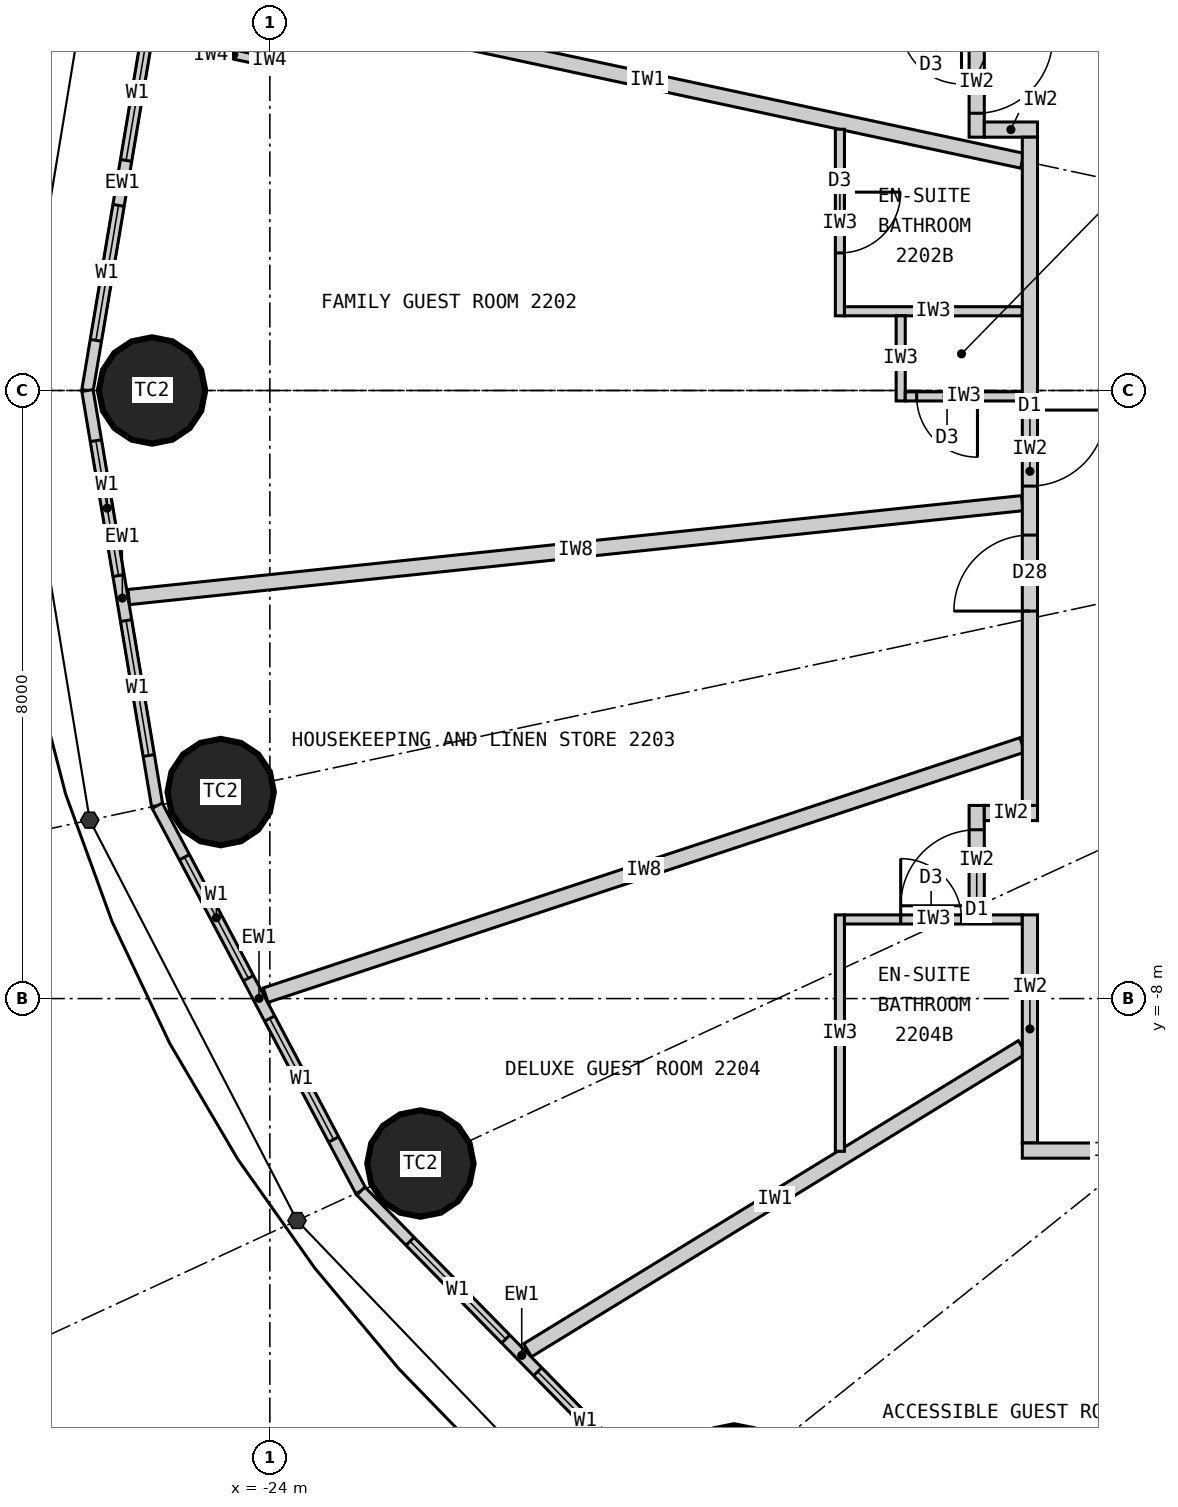
"""IFC4 building model, lengths in metres.
Left out: names, types, materials, properties, quantities, classifications, styles, units other than length and angle.
Written with IfcOpenShell. Run it as: python <this file> out.ifc"""

import sys

from ifc_helpers import new_model, si_unit, direction, frame, frame_2d, origin, origin_2d, place, context, subcontext, project, spatial, rectangle, circle, extrude, element, fill, save


model = new_model("IFC4")
c1 = context("Model", 3, precision=1e-05, world=origin(), true_north=direction((0.0, 1.0)))
c2 = subcontext(c1, "Body", "Model", "MODEL_VIEW")
j1 = project(units=[si_unit("LENGTHUNIT", "METRE"), si_unit("PLANEANGLEUNIT", "RADIAN")], contexts=[c1])
p1 = place(None, origin())
s1 = spatial("IfcSite", under=j1, at=p1, CompositionType="ELEMENT")
p2 = place(p1, origin())
s2 = spatial("IfcBuilding", under=s1, at=p2, CompositionType="ELEMENT")
p3 = place(p2, frame((0.0, 0.0, 87.0)))
s3 = spatial("IfcBuildingStorey", under=s2, at=p3, CompositionType="ELEMENT", Elevation=87.0)
for number, where, z_axis, x_axis in (
    (1, (-25.55, 0.0, 0.0), (0.0, 0.0, 1.0), (1.0, 0.0, 0.0)),
    (2, (-24.647, -5.283, 0.0), (0.0, 0.0, 1.0), (1.0, 0.0, 0.0)),
    (3, (-22.019, -10.17, 0.0), (0.0, 0.0, 1.0), (1.0, 0.0, 0.0)),
    (4, (-17.892, -14.313, 0.0), (0.0, 0.0, 1.0), (1.0, 0.0, 0.0)),
):
    element("IfcColumn", number, at=place(p3, frame(where, z_axis=z_axis, x_axis=x_axis)), inside=s3, PredefinedType="COLUMN", context=c2, shape_type="SweptSolid", body=[
        extrude(circle(Radius=0.7, at=origin_2d()), origin(), (0.0, 0.0, 1.0), 3.3),
    ])
p4 = place(p3, frame((-25.482, 5.462, 0.0), z_axis=(0.0, 0.0, 1.0), x_axis=(-0.165642551694, -0.986185857264, 0.0)))
e5 = element("IfcWall", 5, at=p4, inside=s3, PredefinedType="ELEMENTEDWALL", context=c2, shape_type="SweptSolid", body=[
    extrude(rectangle(XDim=5.539, YDim=0.15, at=frame_2d((2.77, 0.0))), origin(), (0.0, 0.0, 1.0), 3.12),
])
p5 = place(p4, frame((0.669, 0.0, 0.9)))
e6 = element("IfcOpeningElement", 6, at=p5, cuts=e5, PredefinedType="OPENING", context=c2, shape_type="SweptSolid", body=[
    extrude(rectangle(XDim=1.8, YDim=1.9, at=frame_2d((0.9, 0.95))), frame((0.0, 0.085, 0.0), z_axis=(0.0, -1.0, 0.0), x_axis=(1.0, 0.0, 0.0)), (0.0, 0.0, 1.0), 0.17),
])
p6 = place(p4, frame((3.07, 0.0, 0.9)))
e7 = element("IfcOpeningElement", 7, at=p6, cuts=e5, PredefinedType="OPENING", context=c2, shape_type="SweptSolid", body=[
    extrude(rectangle(XDim=1.8, YDim=1.9, at=frame_2d((0.9, 0.95))), frame((0.0, 0.085, 0.0), z_axis=(0.0, -1.0, 0.0), x_axis=(1.0, 0.0, 0.0)), (0.0, 0.0, 1.0), 0.17),
])
p7 = place(p3, frame((-26.4, 0.0, 0.0), z_axis=(0.0, 0.0, 1.0), x_axis=(0.165642551694, -0.986185857264, 0.0)))
e8 = element("IfcWall", 8, at=p7, inside=s3, PredefinedType="ELEMENTEDWALL", context=c2, shape_type="SweptSolid", body=[
    extrude(rectangle(XDim=5.539, YDim=0.15, at=frame_2d((2.77, 0.0))), origin(), (0.0, 0.0, 1.0), 3.12),
])
p8 = place(p7, frame((0.669, 0.0, 0.9)))
e9 = element("IfcOpeningElement", 9, at=p8, cuts=e8, PredefinedType="OPENING", context=c2, shape_type="SweptSolid", body=[
    extrude(rectangle(XDim=1.8, YDim=1.9, at=frame_2d((0.9, 0.95))), frame((0.0, 0.085, 0.0), z_axis=(0.0, -1.0, 0.0), x_axis=(1.0, 0.0, 0.0)), (0.0, 0.0, 1.0), 0.17),
])
p9 = place(p7, frame((3.07, 0.0, 0.9)))
e10 = element("IfcOpeningElement", 10, at=p9, cuts=e8, PredefinedType="OPENING", context=c2, shape_type="SweptSolid", body=[
    extrude(rectangle(XDim=1.8, YDim=1.9, at=frame_2d((0.9, 0.95))), frame((0.0, 0.085, 0.0), z_axis=(0.0, -1.0, 0.0), x_axis=(1.0, 0.0, 0.0)), (0.0, 0.0, 1.0), 0.17),
])
p10 = place(p3, frame((-25.482, -5.462, 0.0), z_axis=(0.0, 0.0, 1.0), x_axis=(0.467296867008, -0.884100468321, 0.0)))
e11 = element("IfcWall", 11, at=p10, inside=s3, PredefinedType="ELEMENTEDWALL", context=c2, shape_type="SweptSolid", body=[
    extrude(rectangle(XDim=5.734, YDim=0.15, at=frame_2d((2.867, 0.0))), origin(), (0.0, 0.0, 1.0), 3.12),
])
p11 = place(p10, frame((0.767, 0.0, 0.9)))
e12 = element("IfcOpeningElement", 12, at=p11, cuts=e11, PredefinedType="OPENING", context=c2, shape_type="SweptSolid", body=[
    extrude(rectangle(XDim=1.8, YDim=1.9, at=frame_2d((0.9, 0.95))), frame((0.0, 0.085, 0.0), z_axis=(0.0, -1.0, 0.0), x_axis=(1.0, 0.0, 0.0)), (0.0, 0.0, 1.0), 0.17),
])
p12 = place(p10, frame((3.167, 0.0, 0.9)))
e13 = element("IfcOpeningElement", 13, at=p12, cuts=e11, PredefinedType="OPENING", context=c2, shape_type="SweptSolid", body=[
    extrude(rectangle(XDim=1.8, YDim=1.9, at=frame_2d((0.9, 0.95))), frame((0.0, 0.085, 0.0), z_axis=(0.0, -1.0, 0.0), x_axis=(1.0, 0.0, 0.0)), (0.0, 0.0, 1.0), 0.17),
])
p13 = place(p3, frame((-22.803, -10.532, 0.0), z_axis=(0.0, 0.0, 1.0), x_axis=(0.699602905915, -0.714531856557, 0.0)))
e14 = element("IfcWall", 14, at=p13, inside=s3, PredefinedType="ELEMENTEDWALL", context=c2, shape_type="SweptSolid", body=[
    extrude(rectangle(XDim=6.051, YDim=0.15, at=frame_2d((3.025, 0.0))), origin(), (0.0, 0.0, 1.0), 3.12),
])
p14 = place(p13, frame((0.926, 0.0, 0.9)))
e15 = element("IfcOpeningElement", 15, at=p14, cuts=e14, PredefinedType="OPENING", context=c2, shape_type="SweptSolid", body=[
    extrude(rectangle(XDim=1.8, YDim=1.9, at=frame_2d((0.9, 0.95))), frame((0.0, 0.085, 0.0), z_axis=(0.0, -1.0, 0.0), x_axis=(1.0, 0.0, 0.0)), (0.0, 0.0, 1.0), 0.17),
])
p15 = place(p13, frame((3.325, 0.0, 0.9)))
e16 = element("IfcOpeningElement", 16, at=p15, cuts=e14, PredefinedType="OPENING", context=c2, shape_type="SweptSolid", body=[
    extrude(rectangle(XDim=1.8, YDim=1.9, at=frame_2d((0.9, 0.95))), frame((0.0, 0.085, 0.0), z_axis=(0.0, -1.0, 0.0), x_axis=(1.0, 0.0, 0.0)), (0.0, 0.0, 1.0), 0.17),
])
p16 = place(p3, frame((-14.1, 3.022, 0.0), z_axis=(0.0, 0.0, 1.0), x_axis=(-0.977790014929, 0.209586943072, 0.0)))
e17 = element("IfcWall", 17, at=p16, inside=s3, PredefinedType="PARTITIONING", context=c2, shape_type="SweptSolid", body=[
    extrude(rectangle(XDim=10.087, YDim=0.2, at=frame_2d((5.043, 0.0))), origin(), (0.0, 0.0, 1.0), 2.27),
])
p17 = place(p3, frame((-14.1, -1.482, 0.0), z_axis=(0.0, 0.0, 1.0), x_axis=(-0.994522076235, -0.104526742422, 0.0)))
e18 = element("IfcWall", 18, at=p17, inside=s3, PredefinedType="PARTITIONING", context=c2, shape_type="SweptSolid", body=[
    extrude(rectangle(XDim=11.821, YDim=0.2, at=frame_2d((5.91, 0.0))), origin(), (0.0, 0.0, 1.0), 2.27),
])
p18 = place(p3, frame((-14.1, -4.663, 0.0), z_axis=(0.0, 0.0, 1.0), x_axis=(-0.949432655039, -0.31397075269, 0.0)))
e19 = element("IfcWall", 19, at=p18, inside=s3, PredefinedType="PARTITIONING", context=c2, shape_type="SweptSolid", body=[
    extrude(rectangle(XDim=10.486, YDim=0.2, at=frame_2d((5.243, 0.0))), origin(), (0.0, 0.0, 1.0), 3.12),
])
p19 = place(p3, frame((-14.1, -8.639, 0.0), z_axis=(0.0, 0.0, 1.0), x_axis=(-0.852672493023, -0.522445805459, 0.0)))
e20 = element("IfcWall", 20, at=p19, inside=s3, PredefinedType="PARTITIONING", context=c2, shape_type="SweptSolid", body=[
    extrude(rectangle(XDim=7.633, YDim=0.2, at=frame_2d((3.817, 0.0))), origin(), (0.0, 0.0, 1.0), 3.12),
])
p20 = place(p3, frame((-16.5, 3.437, 0.0), z_axis=(0.0, 0.0, 1.0), x_axis=(0.0, -1.0, 0.0)))
e21 = element("IfcWall", 21, at=p20, inside=s3, PredefinedType="PARTITIONING", context=c2, shape_type="SweptSolid", body=[
    extrude(rectangle(XDim=2.455, YDim=0.12, at=frame_2d((1.227, 0.0))), origin(), (0.0, 0.0, 1.0), 3.12),
])
p21 = place(p20, frame((0.827, 0.0, 0.0)))
e22 = element("IfcOpeningElement", 22, at=p21, cuts=e21, PredefinedType="OPENING", context=c2, shape_type="SweptSolid", body=[
    extrude(rectangle(XDim=0.8, YDim=2.1, at=frame_2d((0.4, 1.05))), frame((0.0, 0.07, 0.0), z_axis=(0.0, -1.0, 0.0), x_axis=(1.0, 0.0, 0.0)), (0.0, 0.0, 1.0), 0.14),
])
p22 = place(p3, frame((-14.1, 1.042, 0.0), z_axis=(0.0, 0.0, 1.0), x_axis=(-1.0, 0.0, 0.0)))
e23 = element("IfcWall", 23, at=p22, inside=s3, PredefinedType="PARTITIONING", context=c2, shape_type="SweptSolid", body=[
    extrude(rectangle(XDim=2.34, YDim=0.12, at=frame_2d((1.17, 0.0))), origin(), (0.0, 0.0, 1.0), 3.12),
])
p23 = place(p3, frame((-15.7, 0.982, 0.0), z_axis=(0.0, 0.0, 1.0), x_axis=(0.0, -1.0, 0.0)))
e24 = element("IfcWall", 24, at=p23, inside=s3, PredefinedType="PARTITIONING", context=c2, shape_type="SweptSolid", body=[
    extrude(rectangle(XDim=1.12, YDim=0.12, at=frame_2d((0.56, 0.0))), origin(), (0.0, 0.0, 1.0), 3.12),
])
p24 = place(p3, frame((-14.1, -0.078, 0.0), z_axis=(0.0, 0.0, 1.0), x_axis=(-1.0, 0.0, 0.0)))
e25 = element("IfcWall", 25, at=p24, inside=s3, PredefinedType="PARTITIONING", context=c2, shape_type="SweptSolid", body=[
    extrude(rectangle(XDim=1.54, YDim=0.12, at=frame_2d((0.77, 0.0))), origin(), (0.0, 0.0, 1.0), 2.22),
])
p25 = place(p24, frame((0.59, 0.0, 0.0)))
e26 = element("IfcOpeningElement", 26, at=p25, cuts=e25, PredefinedType="OPENING", context=c2, shape_type="SweptSolid", body=[
    extrude(rectangle(XDim=0.8, YDim=2.1, at=frame_2d((0.4, 1.05))), frame((0.0, 0.07, 0.0), z_axis=(0.0, -1.0, 0.0), x_axis=(1.0, 0.0, 0.0)), (0.0, 0.0, 1.0), 0.14),
])
p26 = place(p3, frame((-16.5, -10.01, 0.0), z_axis=(0.0, 0.0, 1.0), x_axis=(0.0, 1.0, 0.0)))
e27 = element("IfcWall", 27, at=p26, inside=s3, PredefinedType="PARTITIONING", context=c2, shape_type="SweptSolid", body=[
    extrude(rectangle(XDim=3.111, YDim=0.12, at=frame_2d((1.555, 0.0))), origin(), (0.0, 0.0, 1.0), 3.12),
])
p27 = place(p3, frame((-14.1, -6.959, 0.0), z_axis=(0.0, 0.0, 1.0), x_axis=(-1.0, 0.0, 0.0)))
e28 = element("IfcWall", 28, at=p27, inside=s3, PredefinedType="PARTITIONING", context=c2, shape_type="SweptSolid", body=[
    extrude(rectangle(XDim=2.34, YDim=0.12, at=frame_2d((1.17, 0.0))), origin(), (0.0, 0.0, 1.0), 3.12),
])
p28 = place(p27, frame((0.8, 0.0, 0.0)))
e29 = element("IfcOpeningElement", 29, at=p28, cuts=e28, PredefinedType="OPENING", context=c2, shape_type="SweptSolid", body=[
    extrude(rectangle(XDim=0.8, YDim=2.1, at=frame_2d((0.4, 1.05))), frame((0.0, 0.07, 0.0), z_axis=(0.0, -1.0, 0.0), x_axis=(1.0, 0.0, 0.0)), (0.0, 0.0, 1.0), 0.14),
])
p29 = place(p3, frame((-14.7, 4.772, 0.0), z_axis=(0.0, 0.0, 1.0), x_axis=(0.0, -1.0, 0.0)))
e30 = element("IfcWall", 30, at=p29, inside=s3, PredefinedType="PARTITIONING", context=c2, shape_type="SweptSolid", body=[
    extrude(rectangle(XDim=1.44, YDim=0.2, at=frame_2d((0.72, 0.0))), origin(), (0.0, 0.0, 1.0), 3.12),
])
p30 = place(p29, frame((0.125, 0.0, 0.0)))
e31 = element("IfcOpeningElement", 31, at=p30, cuts=e30, PredefinedType="OPENING", context=c2, shape_type="SweptSolid", body=[
    extrude(rectangle(XDim=1.0, YDim=2.0, at=frame_2d((0.5, 1.0))), frame((0.0, 0.11, 0.0), z_axis=(0.0, -1.0, 0.0), x_axis=(1.0, 0.0, 0.0)), (0.0, 0.0, 1.0), 0.22),
])
p31 = place(p3, frame((-13.9, 3.433, 0.0), z_axis=(0.0, 0.0, 1.0), x_axis=(-1.0, 0.0, 0.0)))
e32 = element("IfcWall", 32, at=p31, inside=s3, PredefinedType="PARTITIONING", context=c2, shape_type="SweptSolid", body=[
    extrude(rectangle(XDim=0.7, YDim=0.2, at=frame_2d((0.35, 0.0))), origin(), (0.0, 0.0, 1.0), 2.27),
])
p32 = place(p3, frame((-14.7, -5.459, 0.0), z_axis=(0.0, 0.0, 1.0), x_axis=(0.0, -1.0, 0.0)))
e33 = element("IfcWall", 33, at=p32, inside=s3, PredefinedType="PARTITIONING", context=c2, shape_type="SweptSolid", body=[
    extrude(rectangle(XDim=1.44, YDim=0.2, at=frame_2d((0.72, 0.0))), origin(), (0.0, 0.0, 1.0), 3.12),
])
p33 = place(p32, frame((0.32, 0.0, 0.0)))
e34 = element("IfcOpeningElement", 34, at=p33, cuts=e33, PredefinedType="OPENING", context=c2, shape_type="SweptSolid", body=[
    extrude(rectangle(XDim=1.0, YDim=2.2, at=frame_2d((0.5, 1.1))), frame((0.0, 0.11, 0.0), z_axis=(0.0, -1.0, 0.0), x_axis=(1.0, 0.0, 0.0)), (0.0, 0.0, 1.0), 0.22),
])
p34 = place(p3, frame((-13.9, -5.559, 0.0), z_axis=(0.0, 0.0, 1.0), x_axis=(-1.0, 0.0, 0.0)))
e35 = element("IfcWall", 35, at=p34, inside=s3, PredefinedType="PARTITIONING", context=c2, shape_type="SweptSolid", body=[
    extrude(rectangle(XDim=0.7, YDim=0.2, at=frame_2d((0.35, 0.0))), origin(), (0.0, 0.0, 1.0), 3.12),
])
p35 = place(p3, frame((-14.0, 3.333, 0.0), z_axis=(0.0, 0.0, 1.0), x_axis=(0.0, -1.0, 0.0)))
e36 = element("IfcWall", 36, at=p35, inside=s3, PredefinedType="PARTITIONING", context=c2, shape_type="SweptSolid", body=[
    extrude(rectangle(XDim=8.792, YDim=0.2, at=frame_2d((4.396, 0.0))), origin(), (0.0, 0.0, 1.0), 3.12),
])
p36 = place(p35, frame((3.59, 0.0, 0.0)))
e37 = element("IfcOpeningElement", 37, at=p36, cuts=e36, PredefinedType="OPENING", context=c2, shape_type="SweptSolid", body=[
    extrude(rectangle(XDim=1.0, YDim=2.2, at=frame_2d((0.5, 1.1))), frame((0.0, 0.11, 0.0), z_axis=(0.0, -1.0, 0.0), x_axis=(1.0, 0.0, 0.0)), (0.0, 0.0, 1.0), 0.22),
])
p37 = place(p35, frame((5.234, 0.0, 0.0)))
e38 = element("IfcOpeningElement", 38, at=p37, cuts=e36, PredefinedType="OPENING", context=c2, shape_type="SweptSolid", body=[
    extrude(rectangle(XDim=1.0, YDim=2.2, at=frame_2d((0.5, 1.1))), frame((0.0, 0.11, 0.0), z_axis=(0.0, -1.0, 0.0), x_axis=(1.0, 0.0, 0.0)), (0.0, 0.0, 1.0), 0.22),
])
p38 = place(p3, frame((-14.0, -6.899, 0.0), z_axis=(0.0, 0.0, 1.0), x_axis=(0.0, -1.0, 0.0)))
e39 = element("IfcWall", 39, at=p38, inside=s3, PredefinedType="PARTITIONING", context=c2, shape_type="SweptSolid", body=[
    extrude(rectangle(XDim=3.001, YDim=0.2, at=frame_2d((1.5, 0.0))), origin(), (0.0, 0.0, 1.0), 3.12),
])
p39 = place(p3, frame((-11.769, -10.0, 0.0), z_axis=(0.0, 0.0, 1.0), x_axis=(-1.0, 0.0, 0.0)))
e40 = element("IfcWall", 40, at=p39, inside=s3, PredefinedType="PARTITIONING", context=c2, shape_type="SweptSolid", body=[
    extrude(rectangle(XDim=2.331, YDim=0.2, at=frame_2d((1.166, 0.0))), origin(), (0.0, 0.0, 1.0), 3.12),
])
p40 = place(p3, frame((-23.925, 5.026, 0.0), z_axis=(0.0, 0.0, 1.0), x_axis=(-0.209681192172, -0.977769808109, 0.0)))
e41 = element("IfcWall", 41, at=p40, inside=s3, PredefinedType="PARTITIONING", context=c2, shape_type="SweptSolid", body=[
    extrude(rectangle(XDim=0.767, YDim=0.12, at=frame_2d((0.384, 0.0))), origin(), (0.0, 0.0, 1.0), 3.12),
])
p41 = place(p3, frame((-24.132, 4.347, 0.0), z_axis=(0.0, 0.0, 1.0), x_axis=(-0.977776882509, 0.209648200638, 0.0)))
e42 = element("IfcWall", 42, at=p41, inside=s3, PredefinedType="PARTITIONING", context=c2, shape_type="SweptSolid", body=[
    extrude(rectangle(XDim=0.7, YDim=0.12, at=frame_2d((0.35, 0.0))), origin(), (0.0, 0.0, 1.0), 3.12),
])
p42 = place(p3, frame((-24.816, 4.494, 0.0), z_axis=(0.0, 0.0, 1.0), x_axis=(-0.890303208847, 0.455368198623, 0.0)))
e43 = element("IfcWall", 43, at=p42, inside=s3, PredefinedType="PARTITIONING", context=c2, shape_type="SweptSolid", body=[
    extrude(rectangle(XDim=0.418, YDim=0.12, at=frame_2d((0.209, 0.0))), origin(), (0.0, 0.0, 1.0), 3.12),
])
p43 = place(p5, origin())
e44 = element("IfcWindow", 44, at=p43, inside=s3, PartitioningType="SINGLE_PANEL", PredefinedType="WINDOW", context=c2, shape_type="SweptSolid", body=[
    extrude(rectangle(XDim=1.8, YDim=1.9, at=frame_2d((0.9, 0.95))), frame((0.0, 0.03, 0.0), z_axis=(0.0, -1.0, 0.0), x_axis=(1.0, 0.0, 0.0)), (0.0, 0.0, 1.0), 0.06),
])
fill(e6, e44)
p44 = place(p6, origin())
e45 = element("IfcWindow", 45, at=p44, inside=s3, PartitioningType="SINGLE_PANEL", PredefinedType="WINDOW", context=c2, shape_type="SweptSolid", body=[
    extrude(rectangle(XDim=1.8, YDim=1.9, at=frame_2d((0.9, 0.95))), frame((0.0, 0.03, 0.0), z_axis=(0.0, -1.0, 0.0), x_axis=(1.0, 0.0, 0.0)), (0.0, 0.0, 1.0), 0.06),
])
fill(e7, e45)
p45 = place(p8, origin())
e46 = element("IfcWindow", 46, at=p45, inside=s3, PartitioningType="SINGLE_PANEL", PredefinedType="WINDOW", context=c2, shape_type="SweptSolid", body=[
    extrude(rectangle(XDim=1.8, YDim=1.9, at=frame_2d((0.9, 0.95))), frame((0.0, 0.03, 0.0), z_axis=(0.0, -1.0, 0.0), x_axis=(1.0, 0.0, 0.0)), (0.0, 0.0, 1.0), 0.06),
])
fill(e9, e46)
p46 = place(p9, origin())
e47 = element("IfcWindow", 47, at=p46, inside=s3, PartitioningType="SINGLE_PANEL", PredefinedType="WINDOW", context=c2, shape_type="SweptSolid", body=[
    extrude(rectangle(XDim=1.8, YDim=1.9, at=frame_2d((0.9, 0.95))), frame((0.0, 0.03, 0.0), z_axis=(0.0, -1.0, 0.0), x_axis=(1.0, 0.0, 0.0)), (0.0, 0.0, 1.0), 0.06),
])
fill(e10, e47)
p47 = place(p11, origin())
e48 = element("IfcWindow", 48, at=p47, inside=s3, PartitioningType="SINGLE_PANEL", PredefinedType="WINDOW", context=c2, shape_type="SweptSolid", body=[
    extrude(rectangle(XDim=1.8, YDim=1.9, at=frame_2d((0.9, 0.95))), frame((0.0, 0.03, 0.0), z_axis=(0.0, -1.0, 0.0), x_axis=(1.0, 0.0, 0.0)), (0.0, 0.0, 1.0), 0.06),
])
fill(e12, e48)
p48 = place(p12, origin())
e49 = element("IfcWindow", 49, at=p48, inside=s3, PartitioningType="SINGLE_PANEL", PredefinedType="WINDOW", context=c2, shape_type="SweptSolid", body=[
    extrude(rectangle(XDim=1.8, YDim=1.9, at=frame_2d((0.9, 0.95))), frame((0.0, 0.03, 0.0), z_axis=(0.0, -1.0, 0.0), x_axis=(1.0, 0.0, 0.0)), (0.0, 0.0, 1.0), 0.06),
])
fill(e13, e49)
p49 = place(p14, origin())
e50 = element("IfcWindow", 50, at=p49, inside=s3, PartitioningType="SINGLE_PANEL", PredefinedType="WINDOW", context=c2, shape_type="SweptSolid", body=[
    extrude(rectangle(XDim=1.8, YDim=1.9, at=frame_2d((0.9, 0.95))), frame((0.0, 0.03, 0.0), z_axis=(0.0, -1.0, 0.0), x_axis=(1.0, 0.0, 0.0)), (0.0, 0.0, 1.0), 0.06),
])
fill(e15, e50)
p50 = place(p15, origin())
e51 = element("IfcWindow", 51, at=p50, inside=s3, PartitioningType="SINGLE_PANEL", PredefinedType="WINDOW", context=c2, shape_type="SweptSolid", body=[
    extrude(rectangle(XDim=1.8, YDim=1.9, at=frame_2d((0.9, 0.95))), frame((0.0, 0.03, 0.0), z_axis=(0.0, -1.0, 0.0), x_axis=(1.0, 0.0, 0.0)), (0.0, 0.0, 1.0), 0.06),
])
fill(e16, e51)
p51 = place(p30, origin())
e52 = element("IfcDoor", 52, at=p51, inside=s3, OperationType="SINGLE_SWING_LEFT", PredefinedType="DOOR", context=c2, shape_type="SweptSolid", body=[
    extrude(rectangle(XDim=1.0, YDim=2.0, at=frame_2d((0.5, 1.0))), frame((0.0, 0.025, 0.0), z_axis=(0.0, -1.0, 0.0), x_axis=(1.0, 0.0, 0.0)), (0.0, 0.0, 1.0), 0.05),
])
fill(e31, e52)
p52 = place(p21, origin())
e53 = element("IfcDoor", 53, at=p52, inside=s3, OperationType="SINGLE_SWING_LEFT", PredefinedType="DOOR", context=c2, shape_type="SweptSolid", body=[
    extrude(rectangle(XDim=0.8, YDim=2.1, at=frame_2d((0.4, 1.05))), frame((0.0, 0.025, 0.0), z_axis=(0.0, -1.0, 0.0), x_axis=(1.0, 0.0, 0.0)), (0.0, 0.0, 1.0), 0.05),
])
fill(e22, e53)
p53 = place(p25, origin())
e54 = element("IfcDoor", 54, at=p53, inside=s3, OperationType="SINGLE_SWING_LEFT", PredefinedType="DOOR", context=c2, shape_type="SweptSolid", body=[
    extrude(rectangle(XDim=0.8, YDim=2.1, at=frame_2d((0.4, 1.05))), frame((0.0, 0.025, 0.0), z_axis=(0.0, -1.0, 0.0), x_axis=(1.0, 0.0, 0.0)), (0.0, 0.0, 1.0), 0.05),
])
fill(e26, e54)
p54 = place(p36, origin())
e55 = element("IfcDoor", 55, at=p54, inside=s3, OperationType="SINGLE_SWING_LEFT", PredefinedType="DOOR", context=c2, shape_type="SweptSolid", body=[
    extrude(rectangle(XDim=1.0, YDim=2.2, at=frame_2d((0.5, 1.1))), frame((0.0, 0.025, 0.0), z_axis=(0.0, -1.0, 0.0), x_axis=(1.0, 0.0, 0.0)), (0.0, 0.0, 1.0), 0.05),
])
fill(e37, e55)
p55 = place(p37, origin())
e56 = element("IfcDoor", 56, at=p55, inside=s3, OperationType="SINGLE_SWING_RIGHT", PredefinedType="DOOR", context=c2, shape_type="SweptSolid", body=[
    extrude(rectangle(XDim=1.0, YDim=2.2, at=frame_2d((0.5, 1.1))), frame((0.0, 0.025, 0.0), z_axis=(0.0, -1.0, 0.0), x_axis=(1.0, 0.0, 0.0)), (0.0, 0.0, 1.0), 0.05),
])
fill(e38, e56)
p56 = place(p28, origin())
e57 = element("IfcDoor", 57, at=p56, inside=s3, OperationType="SINGLE_SWING_RIGHT", PredefinedType="DOOR", context=c2, shape_type="SweptSolid", body=[
    extrude(rectangle(XDim=0.8, YDim=2.1, at=frame_2d((0.4, 1.05))), frame((0.0, 0.025, 0.0), z_axis=(0.0, -1.0, 0.0), x_axis=(1.0, 0.0, 0.0)), (0.0, 0.0, 1.0), 0.05),
])
fill(e29, e57)
p57 = place(p33, origin())
e58 = element("IfcDoor", 58, at=p57, inside=s3, OperationType="SINGLE_SWING_RIGHT", PredefinedType="DOOR", context=c2, shape_type="SweptSolid", body=[
    extrude(rectangle(XDim=1.0, YDim=2.2, at=frame_2d((0.5, 1.1))), frame((0.0, 0.025, 0.0), z_axis=(0.0, -1.0, 0.0), x_axis=(1.0, 0.0, 0.0)), (0.0, 0.0, 1.0), 0.05),
])
fill(e34, e58)
save(model, sys.argv[1])
